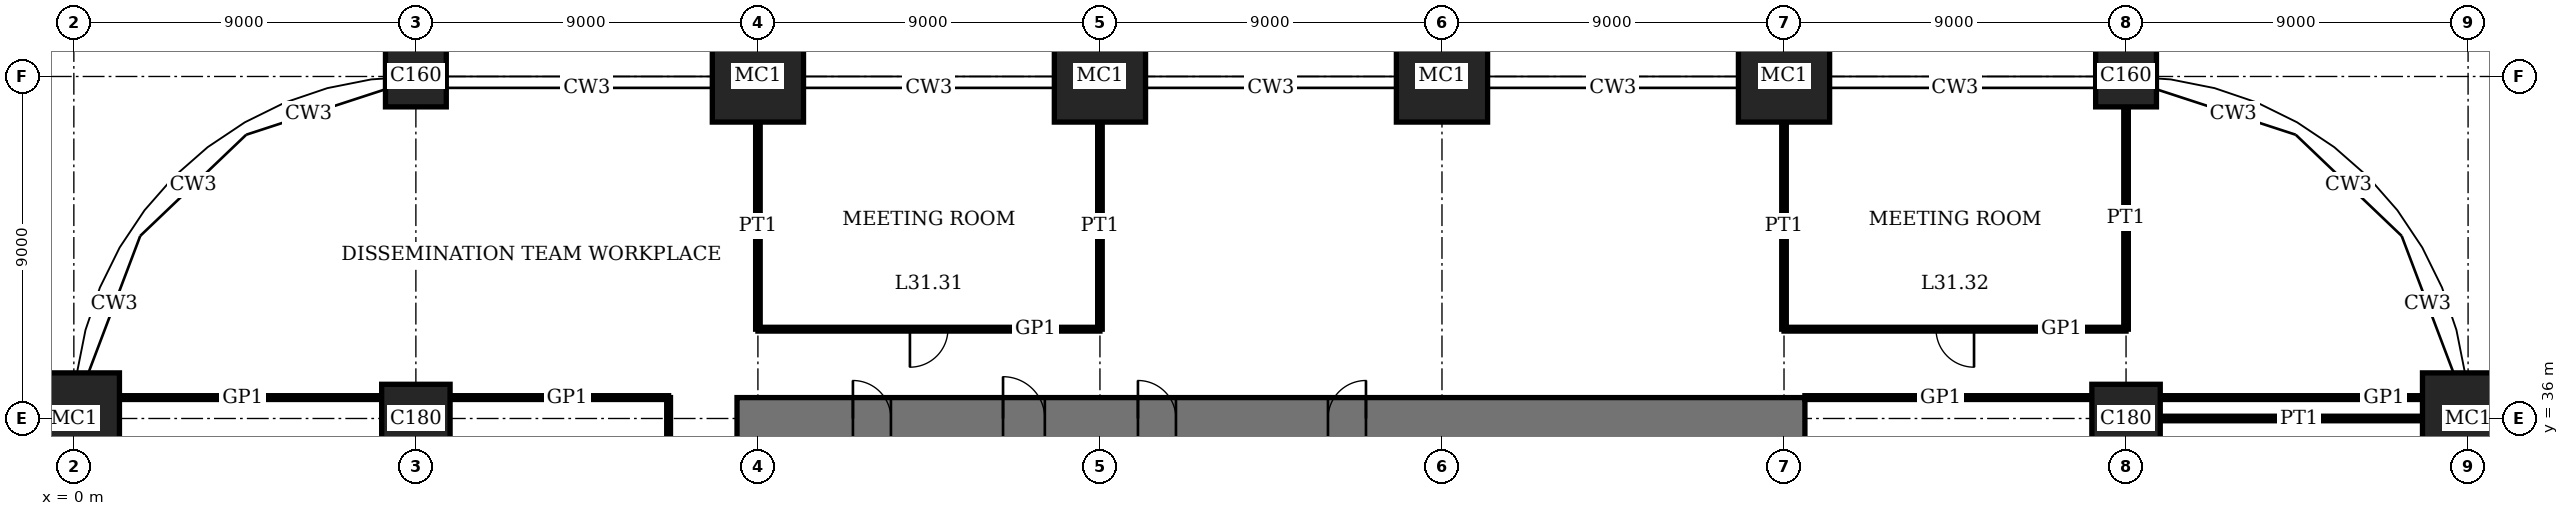
"""IFC4 building model, lengths in metres.
Left out: names, types, materials, properties, quantities, classifications, styles, units other than length and angle.
Written with IfcOpenShell. Run it as: python <this file> out.ifc"""

import sys

from ifc_helpers import new_model, si_unit, direction, frame, frame_2d, origin, origin_2d, place, context, subcontext, project, spatial, rectangle, extrude, element, fill, save


model = new_model("IFC4")
c1 = context("Model", 3, precision=1e-05, world=origin(), true_north=direction((0.0, 1.0)))
c2 = subcontext(c1, "Body", "Model", "MODEL_VIEW")
j1 = project(units=[si_unit("LENGTHUNIT", "METRE"), si_unit("PLANEANGLEUNIT", "RADIAN")], contexts=[c1])
p1 = place(None, origin())
s1 = spatial("IfcSite", under=j1, at=p1, CompositionType="ELEMENT")
p2 = place(p1, origin())
s2 = spatial("IfcBuilding", under=s1, at=p2, CompositionType="ELEMENT")
p3 = place(p2, frame((0.0, 0.0, 129.0)))
s3 = spatial("IfcBuildingStorey", under=s2, at=p3, CompositionType="ELEMENT", Elevation=129.0)
p4 = place(p3, frame((0.0, 36.0, 0.0), z_axis=(0.0, 0.0, 1.0), x_axis=(1.0, 0.0, 0.0)))
e1 = element("IfcColumn", 1, at=p4, inside=s3, PredefinedType="COLUMN", context=c2, shape_type="SweptSolid", body=[
    extrude(rectangle(XDim=2.4, YDim=2.4, at=origin_2d()), origin(), (0.0, 0.0, 1.0), 4.0),
])
p5 = place(p3, frame((9.0, 36.0, 0.0), z_axis=(0.0, 0.0, 1.0), x_axis=(1.0, 0.0, 0.0)))
e2 = element("IfcColumn", 2, at=p5, inside=s3, PredefinedType="COLUMN", context=c2, shape_type="SweptSolid", body=[
    extrude(rectangle(XDim=1.8, YDim=1.8, at=origin_2d()), origin(), (0.0, 0.0, 1.0), 4.0),
])
p6 = place(p3, frame((9.0, 45.0, 0.0), z_axis=(0.0, 0.0, 1.0), x_axis=(1.0, 0.0, 0.0)))
e3 = element("IfcColumn", 3, at=p6, inside=s3, PredefinedType="COLUMN", context=c2, shape_type="SweptSolid", body=[
    extrude(rectangle(XDim=1.6, YDim=1.6, at=origin_2d()), origin(), (0.0, 0.0, 1.0), 4.0),
])
for number, where, z_axis, x_axis in (
    (4, (18.0, 45.0, 0.0), (0.0, 0.0, 1.0), (1.0, 0.0, 0.0)),
    (5, (27.0, 45.0, 0.0), (0.0, 0.0, 1.0), (1.0, 0.0, 0.0)),
    (6, (36.0, 45.0, 0.0), (0.0, 0.0, 1.0), (1.0, 0.0, 0.0)),
    (7, (45.0, 45.0, 0.0), (0.0, 0.0, 1.0), (1.0, 0.0, 0.0)),
):
    element("IfcColumn", number, at=place(p3, frame(where, z_axis=z_axis, x_axis=x_axis)), inside=s3, PredefinedType="COLUMN", context=c2, shape_type="SweptSolid", body=[
        extrude(rectangle(XDim=2.4, YDim=2.4, at=origin_2d()), origin(), (0.0, 0.0, 1.0), 4.0),
    ])
p7 = place(p3, frame((54.0, 36.0, 0.0), z_axis=(0.0, 0.0, 1.0), x_axis=(1.0, 0.0, 0.0)))
e8 = element("IfcColumn", 8, at=p7, inside=s3, PredefinedType="COLUMN", context=c2, shape_type="SweptSolid", body=[
    extrude(rectangle(XDim=1.8, YDim=1.8, at=origin_2d()), origin(), (0.0, 0.0, 1.0), 4.0),
])
p8 = place(p3, frame((54.0, 45.0, 0.0), z_axis=(0.0, 0.0, 1.0), x_axis=(1.0, 0.0, 0.0)))
e9 = element("IfcColumn", 9, at=p8, inside=s3, PredefinedType="COLUMN", context=c2, shape_type="SweptSolid", body=[
    extrude(rectangle(XDim=1.6, YDim=1.6, at=origin_2d()), origin(), (0.0, 0.0, 1.0), 4.0),
])
p9 = place(p3, frame((63.0, 36.0, 0.0), z_axis=(0.0, 0.0, 1.0), x_axis=(1.0, 0.0, 0.0)))
e10 = element("IfcColumn", 10, at=p9, inside=s3, PredefinedType="COLUMN", context=c2, shape_type="SweptSolid", body=[
    extrude(rectangle(XDim=2.4, YDim=2.4, at=origin_2d()), origin(), (0.0, 0.0, 1.0), 4.0),
])
p10 = place(p3, frame((45.55, 36.0, 0.0), z_axis=(0.0, 0.0, 1.0), x_axis=(-1.0, 0.0, 0.0)))
e11 = element("IfcWall", 11, at=p10, inside=s3, PredefinedType="SHEAR", context=c2, shape_type="SweptSolid", body=[
    extrude(rectangle(XDim=28.1, YDim=1.1, at=frame_2d((14.05, 0.0))), origin(), (0.0, 0.0, 1.0), 4.0),
])
p11 = place(p10, frame((11.55, 0.0, 0.0)))
e12 = element("IfcOpeningElement", 12, at=p11, cuts=e11, PredefinedType="OPENING", context=c2, shape_type="SweptSolid", body=[
    extrude(rectangle(XDim=1.0, YDim=2.4, at=frame_2d((0.5, 1.2))), frame((0.0, 0.56, 0.0), z_axis=(0.0, -1.0, 0.0), x_axis=(1.0, 0.0, 0.0)), (0.0, 0.0, 1.0), 1.12),
])
p12 = place(p10, frame((16.55, 0.0, 0.0)))
e13 = element("IfcOpeningElement", 13, at=p12, cuts=e11, PredefinedType="OPENING", context=c2, shape_type="SweptSolid", body=[
    extrude(rectangle(XDim=1.0, YDim=2.4, at=frame_2d((0.5, 1.2))), frame((0.0, 0.56, 0.0), z_axis=(0.0, -1.0, 0.0), x_axis=(1.0, 0.0, 0.0)), (0.0, 0.0, 1.0), 1.12),
])
p13 = place(p10, frame((20.0, 0.0, 0.0)))
e14 = element("IfcOpeningElement", 14, at=p13, cuts=e11, PredefinedType="OPENING", context=c2, shape_type="SweptSolid", body=[
    extrude(rectangle(XDim=1.1, YDim=2.4, at=frame_2d((0.55, 1.2))), frame((0.0, 0.56, 0.0), z_axis=(0.0, -1.0, 0.0), x_axis=(1.0, 0.0, 0.0)), (0.0, 0.0, 1.0), 1.12),
])
p14 = place(p10, frame((24.05, 0.0, 0.0)))
e15 = element("IfcOpeningElement", 15, at=p14, cuts=e11, PredefinedType="OPENING", context=c2, shape_type="SweptSolid", body=[
    extrude(rectangle(XDim=1.0, YDim=2.4, at=frame_2d((0.5, 1.2))), frame((0.0, 0.56, 0.0), z_axis=(0.0, -1.0, 0.0), x_axis=(1.0, 0.0, 0.0)), (0.0, 0.0, 1.0), 1.12),
])
p15 = place(p3, frame((54.9, 36.0, 0.0), z_axis=(0.0, 0.0, 1.0), x_axis=(1.0, 0.0, 0.0)))
e16 = element("IfcWall", 16, at=p15, inside=s3, PredefinedType="PARTITIONING", context=c2, shape_type="SweptSolid", body=[
    extrude(rectangle(XDim=6.9, YDim=0.12, at=frame_2d((3.45, 0.0))), origin(), (0.0, 0.0, 1.0), 3.05),
])
p16 = place(p3, frame((1.2, 36.55, 0.0), z_axis=(0.0, 0.0, 1.0), x_axis=(1.0, 0.0, 0.0)))
e17 = element("IfcWall", 17, at=p16, inside=s3, PredefinedType="PARTITIONING", context=c2, shape_type="SweptSolid", body=[
    extrude(rectangle(XDim=6.9, YDim=0.1, at=frame_2d((3.45, 0.0))), origin(), (0.0, 0.0, 1.0), 3.75),
])
p17 = place(p3, frame((9.9, 36.55, 0.0), z_axis=(0.0, 0.0, 1.0), x_axis=(1.0, 0.0, 0.0)))
e18 = element("IfcWall", 18, at=p17, inside=s3, PredefinedType="PARTITIONING", context=c2, shape_type="SweptSolid", body=[
    extrude(rectangle(XDim=5.75, YDim=0.1, at=frame_2d((2.875, 0.0))), origin(), (0.0, 0.0, 1.0), 3.75),
])
p18 = place(p3, frame((45.55, 36.55, 0.0), z_axis=(0.0, 0.0, 1.0), x_axis=(1.0, 0.0, 0.0)))
e19 = element("IfcWall", 19, at=p18, inside=s3, PredefinedType="PARTITIONING", context=c2, shape_type="SweptSolid", body=[
    extrude(rectangle(XDim=7.55, YDim=0.1, at=frame_2d((3.775, 0.0))), origin(), (0.0, 0.0, 1.0), 3.75),
])
p19 = place(p3, frame((54.9, 36.55, 0.0), z_axis=(0.0, 0.0, 1.0), x_axis=(1.0, 0.0, 0.0)))
e20 = element("IfcWall", 20, at=p19, inside=s3, PredefinedType="PARTITIONING", context=c2, shape_type="SweptSolid", body=[
    extrude(rectangle(XDim=6.9, YDim=0.1, at=frame_2d((3.45, 0.0))), origin(), (0.0, 0.0, 1.0), 3.75),
])
p20 = place(p3, frame((18.0, 38.35, 0.0), z_axis=(0.0, 0.0, 1.0), x_axis=(1.0, 0.0, 0.0)))
e21 = element("IfcWall", 21, at=p20, inside=s3, PredefinedType="PARTITIONING", context=c2, shape_type="SweptSolid", body=[
    extrude(rectangle(XDim=9.0, YDim=0.1, at=frame_2d((4.5, 0.0))), origin(), (0.0, 0.0, 1.0), 3.75),
])
p21 = place(p20, frame((4.0, 0.0, 0.0)))
e22 = element("IfcOpeningElement", 22, at=p21, cuts=e21, PredefinedType="OPENING", context=c2, shape_type="SweptSolid", body=[
    extrude(rectangle(XDim=1.0, YDim=2.4, at=frame_2d((0.5, 1.2))), frame((0.0, 0.06, 0.0), z_axis=(0.0, -1.0, 0.0), x_axis=(1.0, 0.0, 0.0)), (0.0, 0.0, 1.0), 0.12),
])
p22 = place(p3, frame((45.0, 38.35, 0.0), z_axis=(0.0, 0.0, 1.0), x_axis=(1.0, 0.0, 0.0)))
e23 = element("IfcWall", 23, at=p22, inside=s3, PredefinedType="PARTITIONING", context=c2, shape_type="SweptSolid", body=[
    extrude(rectangle(XDim=9.0, YDim=0.1, at=frame_2d((4.5, 0.0))), origin(), (0.0, 0.0, 1.0), 3.75),
])
p23 = place(p22, frame((4.0, 0.0, 0.0)))
e24 = element("IfcOpeningElement", 24, at=p23, cuts=e23, PredefinedType="OPENING", context=c2, shape_type="SweptSolid", body=[
    extrude(rectangle(XDim=1.0, YDim=2.4, at=frame_2d((0.5, 1.2))), frame((0.0, 0.06, 0.0), z_axis=(0.0, -1.0, 0.0), x_axis=(1.0, 0.0, 0.0)), (0.0, 0.0, 1.0), 0.12),
])
p24 = place(p3, frame((15.65, 15.65, 0.0), z_axis=(0.0, 0.0, 1.0), x_axis=(0.0, 1.0, 0.0)))
e25 = element("IfcWall", 25, at=p24, inside=s3, PredefinedType="PARTITIONING", context=c2, shape_type="SweptSolid", body=[
    extrude(rectangle(XDim=20.9, YDim=0.1, at=frame_2d((10.45, 0.0))), origin(), (0.0, 0.0, 1.0), 3.75),
])
p25 = place(p24, frame((9.95, 0.0, 0.0)))
e26 = element("IfcOpeningElement", 26, at=p25, cuts=e25, PredefinedType="OPENING", context=c2, shape_type="SweptSolid", body=[
    extrude(rectangle(XDim=1.0, YDim=2.4, at=frame_2d((0.5, 1.2))), frame((0.0, 0.06, 0.0), z_axis=(0.0, -1.0, 0.0), x_axis=(1.0, 0.0, 0.0)), (0.0, 0.0, 1.0), 0.12),
])
for number, where, z_axis, x_axis in (
    (27, (18.0, 38.35, 0.0), (0.0, 0.0, 1.0), (0.0, 1.0, 0.0)),
    (28, (27.0, 38.35, 0.0), (0.0, 0.0, 1.0), (0.0, 1.0, 0.0)),
    (29, (45.0, 38.35, 0.0), (0.0, 0.0, 1.0), (0.0, 1.0, 0.0)),
):
    element("IfcWall", number, at=place(p3, frame(where, z_axis=z_axis, x_axis=x_axis)), inside=s3, PredefinedType="PARTITIONING", context=c2, shape_type="SweptSolid", body=[
        extrude(rectangle(XDim=5.45, YDim=0.12, at=frame_2d((2.725, 0.0))), origin(), (0.0, 0.0, 1.0), 3.05),
    ])
p26 = place(p3, frame((54.0, 38.35, 0.0), z_axis=(0.0, 0.0, 1.0), x_axis=(0.0, 1.0, 0.0)))
e30 = element("IfcWall", 30, at=p26, inside=s3, PredefinedType="PARTITIONING", context=c2, shape_type="SweptSolid", body=[
    extrude(rectangle(XDim=5.85, YDim=0.12, at=frame_2d((2.925, 0.0))), origin(), (0.0, 0.0, 1.0), 3.05),
])
p27 = place(p11, origin())
e31 = element("IfcDoor", 31, at=p27, inside=s3, OperationType="SINGLE_SWING_LEFT", PredefinedType="DOOR", context=c2, shape_type="SweptSolid", body=[
    extrude(rectangle(XDim=1.0, YDim=2.4, at=frame_2d((0.5, 1.2))), frame((0.0, 0.025, 0.0), z_axis=(0.0, -1.0, 0.0), x_axis=(1.0, 0.0, 0.0)), (0.0, 0.0, 1.0), 0.05),
    extrude(rectangle(XDim=0.04, YDim=2.4, at=frame_2d((0.02, 1.2))), frame((0.0, 0.4, 0.0), z_axis=(0.0, -1.0, 0.0), x_axis=(1.0, 0.0, 0.0)), (0.0, 0.0, 1.0), 0.8),
    extrude(rectangle(XDim=0.04, YDim=2.4, at=frame_2d((0.98, 1.2))), frame((0.0, 0.4, 0.0), z_axis=(0.0, -1.0, 0.0), x_axis=(1.0, 0.0, 0.0)), (0.0, 0.0, 1.0), 0.8),
    extrude(rectangle(XDim=1.0, YDim=0.04, at=frame_2d((0.5, 2.38))), frame((0.0, 0.4, 0.0), z_axis=(0.0, -1.0, 0.0), x_axis=(1.0, 0.0, 0.0)), (0.0, 0.0, 1.0), 0.8),
])
fill(e12, e31)
p28 = place(p12, origin())
e32 = element("IfcDoor", 32, at=p28, inside=s3, OperationType="SINGLE_SWING_RIGHT", PredefinedType="DOOR", context=c2, shape_type="SweptSolid", body=[
    extrude(rectangle(XDim=1.0, YDim=2.4, at=frame_2d((0.5, 1.2))), frame((0.0, 0.025, 0.0), z_axis=(0.0, -1.0, 0.0), x_axis=(1.0, 0.0, 0.0)), (0.0, 0.0, 1.0), 0.05),
    extrude(rectangle(XDim=0.04, YDim=2.4, at=frame_2d((0.02, 1.2))), frame((0.0, 0.4, 0.0), z_axis=(0.0, -1.0, 0.0), x_axis=(1.0, 0.0, 0.0)), (0.0, 0.0, 1.0), 0.8),
    extrude(rectangle(XDim=0.04, YDim=2.4, at=frame_2d((0.98, 1.2))), frame((0.0, 0.4, 0.0), z_axis=(0.0, -1.0, 0.0), x_axis=(1.0, 0.0, 0.0)), (0.0, 0.0, 1.0), 0.8),
    extrude(rectangle(XDim=1.0, YDim=0.04, at=frame_2d((0.5, 2.38))), frame((0.0, 0.4, 0.0), z_axis=(0.0, -1.0, 0.0), x_axis=(1.0, 0.0, 0.0)), (0.0, 0.0, 1.0), 0.8),
])
fill(e13, e32)
p29 = place(p13, origin())
e33 = element("IfcDoor", 33, at=p29, inside=s3, OperationType="SINGLE_SWING_RIGHT", PredefinedType="DOOR", context=c2, shape_type="SweptSolid", body=[
    extrude(rectangle(XDim=1.1, YDim=2.4, at=frame_2d((0.55, 1.2))), frame((0.0, 0.025, 0.0), z_axis=(0.0, -1.0, 0.0), x_axis=(1.0, 0.0, 0.0)), (0.0, 0.0, 1.0), 0.05),
    extrude(rectangle(XDim=0.04, YDim=2.4, at=frame_2d((0.02, 1.2))), frame((0.0, 0.44, 0.0), z_axis=(0.0, -1.0, 0.0), x_axis=(1.0, 0.0, 0.0)), (0.0, 0.0, 1.0), 0.88),
    extrude(rectangle(XDim=0.04, YDim=2.4, at=frame_2d((1.08, 1.2))), frame((0.0, 0.44, 0.0), z_axis=(0.0, -1.0, 0.0), x_axis=(1.0, 0.0, 0.0)), (0.0, 0.0, 1.0), 0.88),
    extrude(rectangle(XDim=1.1, YDim=0.04, at=frame_2d((0.55, 2.38))), frame((0.0, 0.44, 0.0), z_axis=(0.0, -1.0, 0.0), x_axis=(1.0, 0.0, 0.0)), (0.0, 0.0, 1.0), 0.88),
])
fill(e14, e33)
p30 = place(p14, origin())
e34 = element("IfcDoor", 34, at=p30, inside=s3, OperationType="SINGLE_SWING_RIGHT", PredefinedType="DOOR", context=c2, shape_type="SweptSolid", body=[
    extrude(rectangle(XDim=1.0, YDim=2.4, at=frame_2d((0.5, 1.2))), frame((0.0, 0.025, 0.0), z_axis=(0.0, -1.0, 0.0), x_axis=(1.0, 0.0, 0.0)), (0.0, 0.0, 1.0), 0.05),
    extrude(rectangle(XDim=0.04, YDim=2.4, at=frame_2d((0.02, 1.2))), frame((0.0, 0.4, 0.0), z_axis=(0.0, -1.0, 0.0), x_axis=(1.0, 0.0, 0.0)), (0.0, 0.0, 1.0), 0.8),
    extrude(rectangle(XDim=0.04, YDim=2.4, at=frame_2d((0.98, 1.2))), frame((0.0, 0.4, 0.0), z_axis=(0.0, -1.0, 0.0), x_axis=(1.0, 0.0, 0.0)), (0.0, 0.0, 1.0), 0.8),
    extrude(rectangle(XDim=1.0, YDim=0.04, at=frame_2d((0.5, 2.38))), frame((0.0, 0.4, 0.0), z_axis=(0.0, -1.0, 0.0), x_axis=(1.0, 0.0, 0.0)), (0.0, 0.0, 1.0), 0.8),
])
fill(e15, e34)
p31 = place(p21, origin())
e35 = element("IfcDoor", 35, at=p31, inside=s3, OperationType="SINGLE_SWING_LEFT", PredefinedType="DOOR", context=c2, shape_type="SweptSolid", body=[
    extrude(rectangle(XDim=1.0, YDim=2.4, at=frame_2d((0.5, 1.2))), frame((0.0, 0.02, 0.0), z_axis=(0.0, -1.0, 0.0), x_axis=(1.0, 0.0, 0.0)), (0.0, 0.0, 1.0), 0.04),
])
fill(e22, e35)
p32 = place(p23, origin())
e36 = element("IfcDoor", 36, at=p32, inside=s3, OperationType="SINGLE_SWING_RIGHT", PredefinedType="DOOR", context=c2, shape_type="SweptSolid", body=[
    extrude(rectangle(XDim=1.0, YDim=2.4, at=frame_2d((0.5, 1.2))), frame((0.0, 0.02, 0.0), z_axis=(0.0, -1.0, 0.0), x_axis=(1.0, 0.0, 0.0)), (0.0, 0.0, 1.0), 0.04),
])
fill(e24, e36)
save(model, sys.argv[1])
